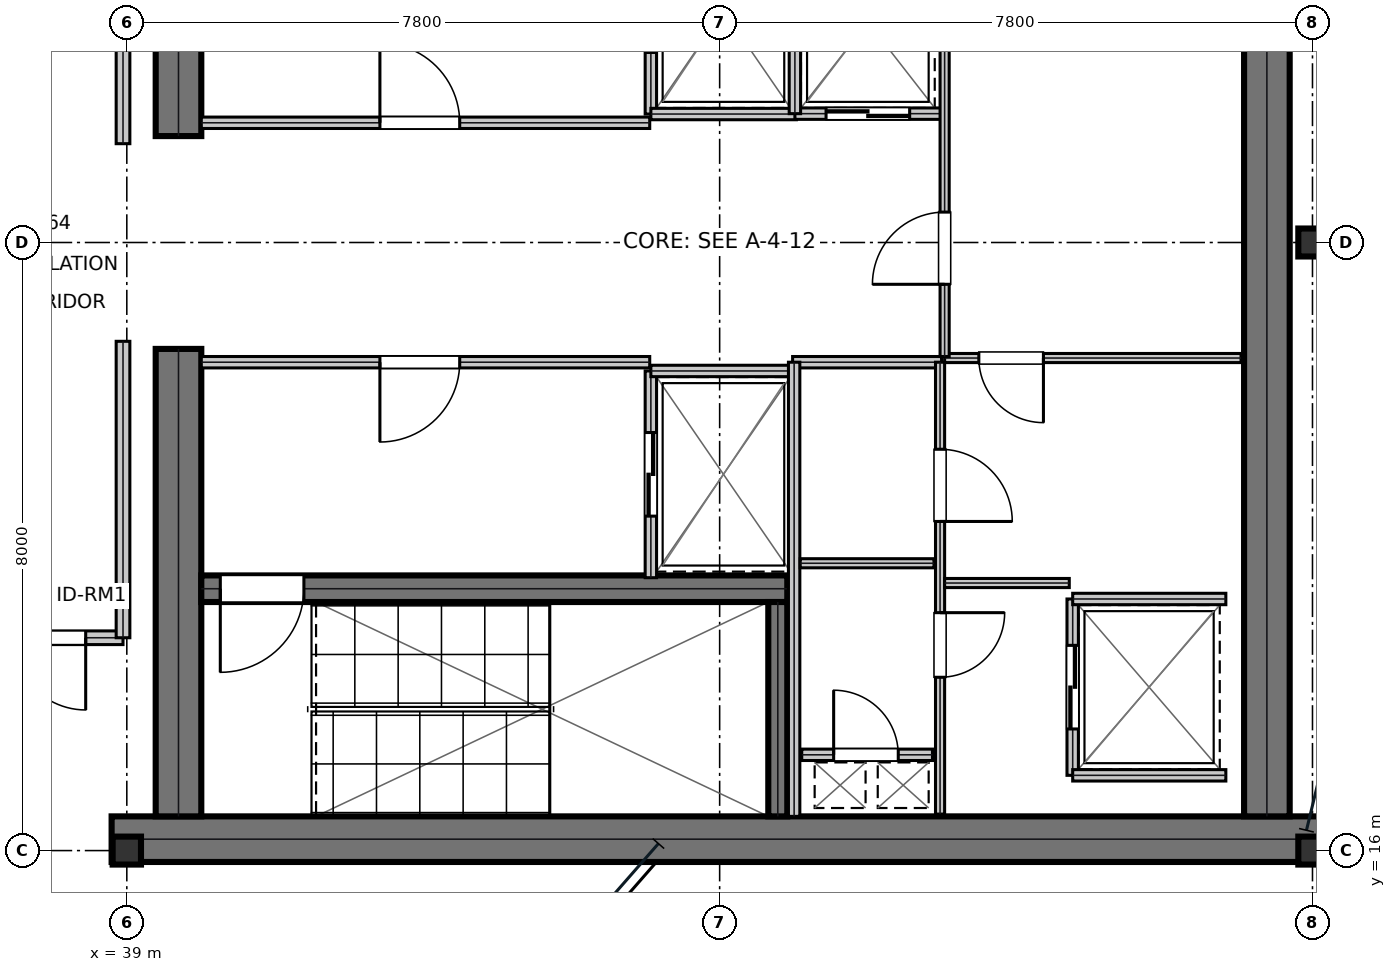
"""IFC4 building model, lengths in metres.
Left out: names, types, materials, properties, quantities, classifications, styles, units other than length and angle.
Written with IfcOpenShell. Run it as: python <this file> out.ifc"""

import sys

from ifc_helpers import new_model, si_unit, direction, frame, frame_2d, origin, origin_2d, place, context, subcontext, project, spatial, rectangle, i_section, extrude, element, fill, save


model = new_model("IFC4")
c1 = context("Model", 3, precision=1e-05, world=origin(), true_north=direction((0.0, 1.0)))
c2 = subcontext(c1, "Body", "Model", "MODEL_VIEW")
j1 = project(units=[si_unit("LENGTHUNIT", "METRE"), si_unit("PLANEANGLEUNIT", "RADIAN")], contexts=[c1])
p1 = place(None, origin())
s1 = spatial("IfcSite", under=j1, at=p1, CompositionType="ELEMENT")
p2 = place(p1, origin())
s2 = spatial("IfcBuilding", under=s1, at=p2, CompositionType="ELEMENT")
p3 = place(p2, frame((0.0, 0.0, 274.95)))
s3 = spatial("IfcBuildingStorey", under=s2, at=p3, CompositionType="ELEMENT", Elevation=274.95)
p4 = place(p3, frame((38.8, 16.15, 0.0), z_axis=(0.0, 0.0, 1.0), x_axis=(1.0, 0.0, 0.0)))
e1 = element("IfcWall", 1, at=p4, inside=s3, PredefinedType="SHEAR", context=c2, shape_type="SweptSolid", body=[
    extrude(rectangle(XDim=16.0, YDim=0.6, at=frame_2d((8.0, 0.0))), origin(), (0.0, 0.0, 1.0), 3.81),
])
for number, where, z_axis, x_axis in (
    (2, (39.68, 16.45, 0.0), (0.0, 0.0, 1.0), (0.0, 1.0, 0.0)),
    (3, (39.68, 25.4, 0.0), (0.0, 0.0, 1.0), (0.0, 1.0, 0.0)),
):
    element("IfcWall", number, at=place(p3, frame(where, z_axis=z_axis, x_axis=x_axis)), inside=s3, PredefinedType="SHEAR", context=c2, shape_type="SweptSolid", body=[
        extrude(rectangle(XDim=6.15, YDim=0.6, at=frame_2d((3.075, 0.0))), origin(), (0.0, 0.0, 1.0), 3.81),
    ])
p5 = place(p3, frame((54.0, 16.45, 0.0), z_axis=(0.0, 0.0, 1.0), x_axis=(0.0, 1.0, 0.0)))
e4 = element("IfcWall", 4, at=p5, inside=s3, PredefinedType="SHEAR", context=c2, shape_type="SweptSolid", body=[
    extrude(rectangle(XDim=15.1, YDim=0.6, at=frame_2d((7.55, 0.0))), origin(), (0.0, 0.0, 1.0), 3.81),
])
p6 = place(p3, frame((39.98, 19.445, 0.0), z_axis=(0.0, 0.0, 1.0), x_axis=(1.0, 0.0, 0.0)))
e5 = element("IfcWall", 5, at=p6, inside=s3, PredefinedType="SHEAR", context=c2, shape_type="SweptSolid", body=[
    extrude(rectangle(XDim=7.71, YDim=0.35, at=frame_2d((3.855, 0.0))), origin(), (0.0, 0.0, 1.0), 3.81),
])
p7 = place(p6, frame((0.25, 0.0, 0.0)))
e6 = element("IfcOpeningElement", 6, at=p7, cuts=e5, PredefinedType="OPENING", context=c2, shape_type="SweptSolid", body=[
    extrude(rectangle(XDim=1.1, YDim=2.15, at=frame_2d((0.55, 1.075))), frame((0.0, 0.185, 0.0), z_axis=(0.0, -1.0, 0.0), x_axis=(1.0, 0.0, 0.0)), (0.0, 0.0, 1.0), 0.37),
])
p8 = place(p3, frame((47.565, 16.45, 0.0), z_axis=(0.0, 0.0, 1.0), x_axis=(0.0, 1.0, 0.0)))
e7 = element("IfcWall", 7, at=p8, inside=s3, PredefinedType="SHEAR", context=c2, shape_type="SweptSolid", body=[
    extrude(rectangle(XDim=2.82, YDim=0.25, at=frame_2d((1.41, 0.0))), origin(), (0.0, 0.0, 1.0), 3.81),
])
for number, where, z_axis, x_axis in (
    (8, (39.0, 16.0, 0.0), (0.0, 0.0, 1.0), (1.0, 0.0, 0.0)),
    (9, (54.6, 16.0, 0.0), (0.0, 0.0, 1.0), (1.0, 0.0, 0.0)),
    (10, (54.6, 24.0, 0.0), (0.0, 0.0, 1.0), (1.0, 0.0, 0.0)),
):
    element("IfcColumn", number, at=place(p3, frame(where, z_axis=z_axis, x_axis=x_axis)), inside=s3, PredefinedType="COLUMN", context=c2, shape_type="SweptSolid", body=[
        extrude(i_section(OverallWidth=0.373, OverallDepth=0.368, WebThickness=0.015, FlangeThickness=0.024, at=origin_2d()), origin(), (0.0, 0.0, 1.0), 4.044),
    ])
p9 = place(p3, frame((39.98, 25.575, 0.0), z_axis=(0.0, 0.0, 1.0), x_axis=(1.0, 0.0, 0.0)))
e11 = element("IfcWall", 11, at=p9, inside=s3, PredefinedType="PARTITIONING", context=c2, shape_type="SweptSolid", body=[
    extrude(rectangle(XDim=5.9, YDim=0.15, at=frame_2d((2.95, 0.0))), origin(), (0.0, 0.0, 1.0), 3.81),
])
p10 = place(p9, frame((2.35, 0.0, 0.0)))
e12 = element("IfcOpeningElement", 12, at=p10, cuts=e11, PredefinedType="OPENING", context=c2, shape_type="SweptSolid", body=[
    extrude(rectangle(XDim=1.05, YDim=2.15, at=frame_2d((0.525, 1.075))), frame((0.0, 0.085, 0.0), z_axis=(0.0, -1.0, 0.0), x_axis=(1.0, 0.0, 0.0)), (0.0, 0.0, 1.0), 0.17),
])
p11 = place(p3, frame((39.98, 22.425, 0.0), z_axis=(0.0, 0.0, 1.0), x_axis=(1.0, 0.0, 0.0)))
e13 = element("IfcWall", 13, at=p11, inside=s3, PredefinedType="PARTITIONING", context=c2, shape_type="SweptSolid", body=[
    extrude(rectangle(XDim=5.9, YDim=0.15, at=frame_2d((2.95, 0.0))), origin(), (0.0, 0.0, 1.0), 3.81),
])
p12 = place(p11, frame((2.35, 0.0, 0.0)))
e14 = element("IfcOpeningElement", 14, at=p12, cuts=e13, PredefinedType="OPENING", context=c2, shape_type="SweptSolid", body=[
    extrude(rectangle(XDim=1.05, YDim=2.15, at=frame_2d((0.525, 1.075))), frame((0.0, 0.085, 0.0), z_axis=(0.0, -1.0, 0.0), x_axis=(1.0, 0.0, 0.0)), (0.0, 0.0, 1.0), 0.17),
])
p13 = place(p3, frame((45.895, 25.69, 0.0), z_axis=(0.0, 0.0, 1.0), x_axis=(0.0, 1.0, 0.0)))
e15 = element("IfcWall", 15, at=p13, inside=s3, PredefinedType="PARTITIONING", context=c2, shape_type="SweptSolid", body=[
    extrude(rectangle(XDim=2.72, YDim=0.15, at=frame_2d((1.36, 0.0))), origin(), (0.0, 0.0, 1.0), 3.81),
])
p14 = place(p13, frame((0.81, 0.0, 0.0)))
e16 = element("IfcOpeningElement", 16, at=p14, cuts=e15, PredefinedType="OPENING", context=c2, shape_type="SweptSolid", body=[
    extrude(rectangle(XDim=1.1, YDim=2.15, at=frame_2d((0.55, 1.075))), frame((0.0, 0.085, 0.0), z_axis=(0.0, -1.0, 0.0), x_axis=(1.0, 0.0, 0.0)), (0.0, 0.0, 1.0), 0.17),
])
p15 = place(p3, frame((45.895, 25.69, 0.0), z_axis=(0.0, 0.0, 1.0), x_axis=(1.0, 0.0, 0.0)))
e17 = element("IfcWall", 17, at=p15, inside=s3, PredefinedType="PARTITIONING", context=c2, shape_type="SweptSolid", body=[
    extrude(rectangle(XDim=1.915, YDim=0.15, at=frame_2d((0.958, 0.0))), origin(), (0.0, 0.0, 1.0), 3.81),
])
p16 = place(p3, frame((45.895, 19.59, 0.0), z_axis=(0.0, 0.0, 1.0), x_axis=(0.0, 1.0, 0.0)))
e18 = element("IfcWall", 18, at=p16, inside=s3, PredefinedType="PARTITIONING", context=c2, shape_type="SweptSolid", body=[
    extrude(rectangle(XDim=2.72, YDim=0.15, at=frame_2d((1.36, 0.0))), origin(), (0.0, 0.0, 1.0), 3.81),
])
p17 = place(p16, frame((0.81, 0.0, 0.0)))
e19 = element("IfcOpeningElement", 19, at=p17, cuts=e18, PredefinedType="OPENING", context=c2, shape_type="SweptSolid", body=[
    extrude(rectangle(XDim=1.1, YDim=2.15, at=frame_2d((0.55, 1.075))), frame((0.0, 0.085, 0.0), z_axis=(0.0, -1.0, 0.0), x_axis=(1.0, 0.0, 0.0)), (0.0, 0.0, 1.0), 0.17),
])
p18 = place(p3, frame((45.895, 22.31, 0.0), z_axis=(0.0, 0.0, 1.0), x_axis=(1.0, 0.0, 0.0)))
e20 = element("IfcWall", 20, at=p18, inside=s3, PredefinedType="PARTITIONING", context=c2, shape_type="SweptSolid", body=[
    extrude(rectangle(XDim=1.915, YDim=0.15, at=frame_2d((0.958, 0.0))), origin(), (0.0, 0.0, 1.0), 3.81),
])
p19 = place(p3, frame((47.79, 25.695, 0.0), z_axis=(0.0, 0.0, 1.0), x_axis=(1.0, 0.0, 0.0)))
e21 = element("IfcWall", 21, at=p19, inside=s3, PredefinedType="PARTITIONING", context=c2, shape_type="SweptSolid", body=[
    extrude(rectangle(XDim=1.92, YDim=0.15, at=frame_2d((0.96, 0.0))), origin(), (0.0, 0.0, 1.0), 3.81),
])
p20 = place(p19, frame((0.41, 0.0, 0.0)))
e22 = element("IfcOpeningElement", 22, at=p20, cuts=e21, PredefinedType="OPENING", context=c2, shape_type="SweptSolid", body=[
    extrude(rectangle(XDim=1.1, YDim=2.15, at=frame_2d((0.55, 1.075))), frame((0.0, 0.085, 0.0), z_axis=(0.0, -1.0, 0.0), x_axis=(1.0, 0.0, 0.0)), (0.0, 0.0, 1.0), 0.17),
])
p21 = place(p3, frame((47.79, 25.695, 0.0), z_axis=(0.0, 0.0, 1.0), x_axis=(0.0, 1.0, 0.0)))
e23 = element("IfcWall", 23, at=p21, inside=s3, PredefinedType="PARTITIONING", context=c2, shape_type="SweptSolid", body=[
    extrude(rectangle(XDim=2.415, YDim=0.15, at=frame_2d((1.208, 0.0))), origin(), (0.0, 0.0, 1.0), 3.81),
])
p22 = place(p3, frame((51.445, 16.99, 0.0), z_axis=(0.0, 0.0, 1.0), x_axis=(0.0, 1.0, 0.0)))
e24 = element("IfcWall", 24, at=p22, inside=s3, PredefinedType="PARTITIONING", context=c2, shape_type="SweptSolid", body=[
    extrude(rectangle(XDim=2.32, YDim=0.15, at=frame_2d((1.16, 0.0))), origin(), (0.0, 0.0, 1.0), 3.81),
])
p23 = place(p22, frame((0.61, 0.0, 0.0)))
e25 = element("IfcOpeningElement", 25, at=p23, cuts=e24, PredefinedType="OPENING", context=c2, shape_type="SweptSolid", body=[
    extrude(rectangle(XDim=1.1, YDim=2.15, at=frame_2d((0.55, 1.075))), frame((0.0, 0.085, 0.0), z_axis=(0.0, -1.0, 0.0), x_axis=(1.0, 0.0, 0.0)), (0.0, 0.0, 1.0), 0.17),
])
for number, where, z_axis, x_axis in (
    (26, (51.445, 16.99, 0.0), (0.0, 0.0, 1.0), (1.0, 0.0, 0.0)),
    (27, (51.445, 19.31, 0.0), (0.0, 0.0, 1.0), (1.0, 0.0, 0.0)),
):
    element("IfcWall", number, at=place(p3, frame(where, z_axis=z_axis, x_axis=x_axis)), inside=s3, PredefinedType="PARTITIONING", context=c2, shape_type="SweptSolid", body=[
        extrude(rectangle(XDim=2.015, YDim=0.15, at=frame_2d((1.007, 0.0))), origin(), (0.0, 0.0, 1.0), 3.81),
    ])
p24 = place(p3, frame((47.88, 17.26, 0.0), z_axis=(0.0, 0.0, 1.0), x_axis=(1.0, 0.0, 0.0)))
e28 = element("IfcWall", 28, at=p24, inside=s3, PredefinedType="PARTITIONING", context=c2, shape_type="SweptSolid", body=[
    extrude(rectangle(XDim=1.72, YDim=0.15, at=frame_2d((0.86, 0.0))), origin(), (0.0, 0.0, 1.0), 3.81),
])
p25 = place(p24, frame((0.42, 0.0, 0.0)))
e29 = element("IfcOpeningElement", 29, at=p25, cuts=e28, PredefinedType="OPENING", context=c2, shape_type="SweptSolid", body=[
    extrude(rectangle(XDim=0.85, YDim=2.15, at=frame_2d((0.425, 1.075))), frame((0.0, 0.085, 0.0), z_axis=(0.0, -1.0, 0.0), x_axis=(1.0, 0.0, 0.0)), (0.0, 0.0, 1.0), 0.17),
])
p26 = place(p3, frame((47.76, 22.425, 0.0), z_axis=(0.0, 0.0, 1.0), x_axis=(1.0, 0.0, 0.0)))
e30 = element("IfcWall", 30, at=p26, inside=s3, PredefinedType="PARTITIONING", context=c2, shape_type="SweptSolid", body=[
    extrude(rectangle(XDim=1.96, YDim=0.15, at=frame_2d((0.98, 0.0))), origin(), (0.0, 0.0, 1.0), 3.81),
])
p27 = place(p3, frame((47.78, 16.45, 0.0), z_axis=(0.0, 0.0, 1.0), x_axis=(0.0, 1.0, 0.0)))
e31 = element("IfcWall", 31, at=p27, inside=s3, PredefinedType="PARTITIONING", context=c2, shape_type="SweptSolid", body=[
    extrude(rectangle(XDim=5.975, YDim=0.15, at=frame_2d((2.988, 0.0))), origin(), (0.0, 0.0, 1.0), 3.81),
])
p28 = place(p3, frame((47.86, 19.78, 0.0), z_axis=(0.0, 0.0, 1.0), x_axis=(1.0, 0.0, 0.0)))
e32 = element("IfcWall", 32, at=p28, inside=s3, PredefinedType="PARTITIONING", context=c2, shape_type="SweptSolid", body=[
    extrude(rectangle(XDim=1.76, YDim=0.12, at=frame_2d((0.88, 0.0))), origin(), (0.0, 0.0, 1.0), 3.81),
])
p29 = place(p3, frame((49.7, 16.48, 0.0), z_axis=(0.0, 0.0, 1.0), x_axis=(0.0, 1.0, 0.0)))
e33 = element("IfcWall", 33, at=p29, inside=s3, PredefinedType="PARTITIONING", context=c2, shape_type="SweptSolid", body=[
    extrude(rectangle(XDim=5.945, YDim=0.12, at=frame_2d((2.973, 0.0))), origin(), (0.0, 0.0, 1.0), 3.81),
])
p30 = place(p29, frame((1.8, 0.0, 0.0)))
e34 = element("IfcOpeningElement", 34, at=p30, cuts=e33, PredefinedType="OPENING", context=c2, shape_type="SweptSolid", body=[
    extrude(rectangle(XDim=0.85, YDim=2.15, at=frame_2d((0.425, 1.075))), frame((0.0, 0.07, 0.0), z_axis=(0.0, -1.0, 0.0), x_axis=(1.0, 0.0, 0.0)), (0.0, 0.0, 1.0), 0.14),
])
p31 = place(p29, frame((3.85, 0.0, 0.0)))
e35 = element("IfcOpeningElement", 35, at=p31, cuts=e33, PredefinedType="OPENING", context=c2, shape_type="SweptSolid", body=[
    extrude(rectangle(XDim=0.95, YDim=2.15, at=frame_2d((0.475, 1.075))), frame((0.0, 0.07, 0.0), z_axis=(0.0, -1.0, 0.0), x_axis=(1.0, 0.0, 0.0)), (0.0, 0.0, 1.0), 0.14),
])
p32 = place(p3, frame((49.76, 22.48, 0.0), z_axis=(0.0, 0.0, 1.0), x_axis=(1.0, 0.0, 0.0)))
e36 = element("IfcWall", 36, at=p32, inside=s3, PredefinedType="PARTITIONING", context=c2, shape_type="SweptSolid", body=[
    extrude(rectangle(XDim=3.9, YDim=0.12, at=frame_2d((1.95, 0.0))), origin(), (0.0, 0.0, 1.0), 3.81),
])
p33 = place(p32, frame((0.45, 0.0, 0.0)))
e37 = element("IfcOpeningElement", 37, at=p33, cuts=e36, PredefinedType="OPENING", context=c2, shape_type="SweptSolid", body=[
    extrude(rectangle(XDim=0.85, YDim=2.15, at=frame_2d((0.425, 1.075))), frame((0.0, 0.07, 0.0), z_axis=(0.0, -1.0, 0.0), x_axis=(1.0, 0.0, 0.0)), (0.0, 0.0, 1.0), 0.14),
])
p34 = place(p3, frame((49.76, 19.52, 0.0), z_axis=(0.0, 0.0, 1.0), x_axis=(1.0, 0.0, 0.0)))
e38 = element("IfcWall", 38, at=p34, inside=s3, PredefinedType="PARTITIONING", context=c2, shape_type="SweptSolid", body=[
    extrude(rectangle(XDim=1.64, YDim=0.12, at=frame_2d((0.82, 0.0))), origin(), (0.0, 0.0, 1.0), 3.81),
])
p35 = place(p3, frame((49.76, 22.5, 0.0), z_axis=(0.0, 0.0, 1.0), x_axis=(0.0, 1.0, 0.0)))
e39 = element("IfcWall", 39, at=p35, inside=s3, PredefinedType="PARTITIONING", context=c2, shape_type="SweptSolid", body=[
    extrude(rectangle(XDim=5.72, YDim=0.12, at=frame_2d((2.86, 0.0))), origin(), (0.0, 0.0, 1.0), 3.81),
])
p36 = place(p35, frame((0.95, 0.0, 0.0)))
e40 = element("IfcOpeningElement", 40, at=p36, cuts=e39, PredefinedType="OPENING", context=c2, shape_type="SweptSolid", body=[
    extrude(rectangle(XDim=0.95, YDim=2.15, at=frame_2d((0.475, 1.075))), frame((0.0, 0.07, 0.0), z_axis=(0.0, -1.0, 0.0), x_axis=(1.0, 0.0, 0.0)), (0.0, 0.0, 1.0), 0.14),
])
p37 = place(p3, frame((35.938, 18.8, 0.0), z_axis=(0.0, 0.0, 1.0), x_axis=(1.0, 0.0, 0.0)))
e41 = element("IfcWall", 41, at=p37, inside=s3, PredefinedType="SOLIDWALL", context=c2, shape_type="SweptSolid", body=[
    extrude(rectangle(XDim=3.012, YDim=0.18, at=frame_2d((1.506, 0.0))), origin(), (0.0, 0.0, 1.0), 3.81),
])
p38 = place(p37, frame((1.571, 0.0, 0.0)))
e42 = element("IfcOpeningElement", 42, at=p38, cuts=e41, PredefinedType="OPENING", context=c2, shape_type="SweptSolid", body=[
    extrude(rectangle(XDim=0.95, YDim=2.15, at=frame_2d((0.475, 1.075))), frame((0.0, 0.1, 0.0), z_axis=(0.0, -1.0, 0.0), x_axis=(1.0, 0.0, 0.0)), (0.0, 0.0, 1.0), 0.2),
])
p39 = place(p3, frame((38.95, 18.8, 0.0), z_axis=(0.0, 0.0, 1.0), x_axis=(0.0, 1.0, 0.0)))
e43 = element("IfcWall", 43, at=p39, inside=s3, PredefinedType="SOLIDWALL", context=c2, shape_type="SweptSolid", body=[
    extrude(rectangle(XDim=3.9, YDim=0.18, at=frame_2d((1.95, 0.0))), origin(), (0.0, 0.0, 1.0), 3.54),
])
p40 = place(p3, frame((38.95, 25.3, 0.0), z_axis=(0.0, 0.0, 1.0), x_axis=(0.0, 1.0, 0.0)))
e44 = element("IfcWall", 44, at=p40, inside=s3, PredefinedType="SOLIDWALL", context=c2, shape_type="SweptSolid", body=[
    extrude(rectangle(XDim=3.5, YDim=0.18, at=frame_2d((1.75, 0.0))), origin(), (0.0, 0.0, 1.0), 3.54),
])
p41 = place(p10, origin())
e45 = element("IfcDoor", 45, at=p41, inside=s3, OperationType="SINGLE_SWING_LEFT", PredefinedType="DOOR", context=c2, shape_type="SweptSolid", body=[
    extrude(rectangle(XDim=1.05, YDim=2.15, at=frame_2d((0.525, 1.075))), frame((0.0, 0.025, 0.0), z_axis=(0.0, -1.0, 0.0), x_axis=(1.0, 0.0, 0.0)), (0.0, 0.0, 1.0), 0.05),
])
fill(e12, e45)
p42 = place(p12, frame((1.05, 0.0, 0.0), z_axis=(0.0, 0.0, 1.0), x_axis=(-1.0, 0.0, 0.0)))
e46 = element("IfcDoor", 46, at=p42, inside=s3, OperationType="SINGLE_SWING_RIGHT", PredefinedType="DOOR", context=c2, shape_type="SweptSolid", body=[
    extrude(rectangle(XDim=1.05, YDim=2.15, at=frame_2d((0.525, 1.075))), frame((0.0, 0.025, 0.0), z_axis=(0.0, -1.0, 0.0), x_axis=(1.0, 0.0, 0.0)), (0.0, 0.0, 1.0), 0.05),
])
fill(e14, e46)
p43 = place(p17, frame((1.1, 0.0, 0.0), z_axis=(0.0, 0.0, 1.0), x_axis=(-1.0, 0.0, 0.0)))
e47 = element("IfcDoor", 47, at=p43, inside=s3, OperationType="DOUBLE_DOOR_SLIDING", PredefinedType="DOOR", context=c2, shape_type="SweptSolid", body=[
    extrude(rectangle(XDim=1.1, YDim=2.15, at=frame_2d((0.55, 1.075))), frame((0.0, 0.025, 0.0), z_axis=(0.0, -1.0, 0.0), x_axis=(1.0, 0.0, 0.0)), (0.0, 0.0, 1.0), 0.05),
])
fill(e19, e47)
p44 = place(p20, frame((1.1, 0.0, 0.0), z_axis=(0.0, 0.0, 1.0), x_axis=(-1.0, 0.0, 0.0)))
e48 = element("IfcDoor", 48, at=p44, inside=s3, OperationType="DOUBLE_DOOR_SLIDING", PredefinedType="DOOR", context=c2, shape_type="SweptSolid", body=[
    extrude(rectangle(XDim=1.1, YDim=2.15, at=frame_2d((0.55, 1.075))), frame((0.0, 0.025, 0.0), z_axis=(0.0, -1.0, 0.0), x_axis=(1.0, 0.0, 0.0)), (0.0, 0.0, 1.0), 0.05),
])
fill(e22, e48)
p45 = place(p23, frame((1.1, 0.0, 0.0), z_axis=(0.0, 0.0, 1.0), x_axis=(-1.0, 0.0, 0.0)))
e49 = element("IfcDoor", 49, at=p45, inside=s3, OperationType="DOUBLE_DOOR_SLIDING", PredefinedType="DOOR", context=c2, shape_type="SweptSolid", body=[
    extrude(rectangle(XDim=1.1, YDim=2.15, at=frame_2d((0.55, 1.075))), frame((0.0, 0.025, 0.0), z_axis=(0.0, -1.0, 0.0), x_axis=(1.0, 0.0, 0.0)), (0.0, 0.0, 1.0), 0.05),
])
fill(e25, e49)
p46 = place(p25, origin())
e50 = element("IfcDoor", 50, at=p46, inside=s3, OperationType="SINGLE_SWING_LEFT", PredefinedType="TRAPDOOR", context=c2, shape_type="SweptSolid", body=[
    extrude(rectangle(XDim=0.85, YDim=2.15, at=frame_2d((0.425, 1.075))), frame((0.0, 0.025, 0.0), z_axis=(0.0, -1.0, 0.0), x_axis=(1.0, 0.0, 0.0)), (0.0, 0.0, 1.0), 0.05),
])
fill(e29, e50)
p47 = place(p30, frame((0.85, 0.0, 0.0), z_axis=(0.0, 0.0, 1.0), x_axis=(-1.0, 0.0, 0.0)))
e51 = element("IfcDoor", 51, at=p47, inside=s3, OperationType="SINGLE_SWING_LEFT", PredefinedType="DOOR", context=c2, shape_type="SweptSolid", body=[
    extrude(rectangle(XDim=0.85, YDim=2.15, at=frame_2d((0.425, 1.075))), frame((0.0, 0.025, 0.0), z_axis=(0.0, -1.0, 0.0), x_axis=(1.0, 0.0, 0.0)), (0.0, 0.0, 1.0), 0.05),
])
fill(e34, e51)
p48 = place(p31, frame((0.95, 0.0, 0.0), z_axis=(0.0, 0.0, 1.0), x_axis=(-1.0, 0.0, 0.0)))
e52 = element("IfcDoor", 52, at=p48, inside=s3, OperationType="SINGLE_SWING_RIGHT", PredefinedType="DOOR", context=c2, shape_type="SweptSolid", body=[
    extrude(rectangle(XDim=0.95, YDim=2.15, at=frame_2d((0.475, 1.075))), frame((0.0, 0.025, 0.0), z_axis=(0.0, -1.0, 0.0), x_axis=(1.0, 0.0, 0.0)), (0.0, 0.0, 1.0), 0.05),
])
fill(e35, e52)
p49 = place(p33, frame((0.85, 0.0, 0.0), z_axis=(0.0, 0.0, 1.0), x_axis=(-1.0, 0.0, 0.0)))
e53 = element("IfcDoor", 53, at=p49, inside=s3, OperationType="SINGLE_SWING_LEFT", PredefinedType="DOOR", context=c2, shape_type="SweptSolid", body=[
    extrude(rectangle(XDim=0.85, YDim=2.15, at=frame_2d((0.425, 1.075))), frame((0.0, 0.025, 0.0), z_axis=(0.0, -1.0, 0.0), x_axis=(1.0, 0.0, 0.0)), (0.0, 0.0, 1.0), 0.05),
])
fill(e37, e53)
p50 = place(p36, origin())
e54 = element("IfcDoor", 54, at=p50, inside=s3, OperationType="SINGLE_SWING_LEFT", PredefinedType="DOOR", context=c2, shape_type="SweptSolid", body=[
    extrude(rectangle(XDim=0.95, YDim=2.15, at=frame_2d((0.475, 1.075))), frame((0.0, 0.025, 0.0), z_axis=(0.0, -1.0, 0.0), x_axis=(1.0, 0.0, 0.0)), (0.0, 0.0, 1.0), 0.05),
])
fill(e40, e54)
p51 = place(p38, frame((0.95, 0.0, 0.0), z_axis=(0.0, 0.0, 1.0), x_axis=(-1.0, 0.0, 0.0)))
e55 = element("IfcDoor", 55, at=p51, inside=s3, OperationType="SINGLE_SWING_LEFT", PredefinedType="DOOR", context=c2, shape_type="SweptSolid", body=[
    extrude(rectangle(XDim=0.95, YDim=2.15, at=frame_2d((0.475, 1.075))), frame((0.0, 0.025, 0.0), z_axis=(0.0, -1.0, 0.0), x_axis=(1.0, 0.0, 0.0)), (0.0, 0.0, 1.0), 0.05),
])
fill(e42, e55)
p52 = place(p7, frame((1.1, 0.0, 0.0), z_axis=(0.0, 0.0, 1.0), x_axis=(-1.0, 0.0, 0.0)))
e56 = element("IfcDoor", 56, at=p52, inside=s3, OperationType="SINGLE_SWING_RIGHT", PredefinedType="DOOR", context=c2, shape_type="SweptSolid", body=[
    extrude(rectangle(XDim=1.1, YDim=2.15, at=frame_2d((0.55, 1.075))), frame((0.0, 0.025, 0.0), z_axis=(0.0, -1.0, 0.0), x_axis=(1.0, 0.0, 0.0)), (0.0, 0.0, 1.0), 0.05),
])
fill(e6, e56)
save(model, sys.argv[1])
